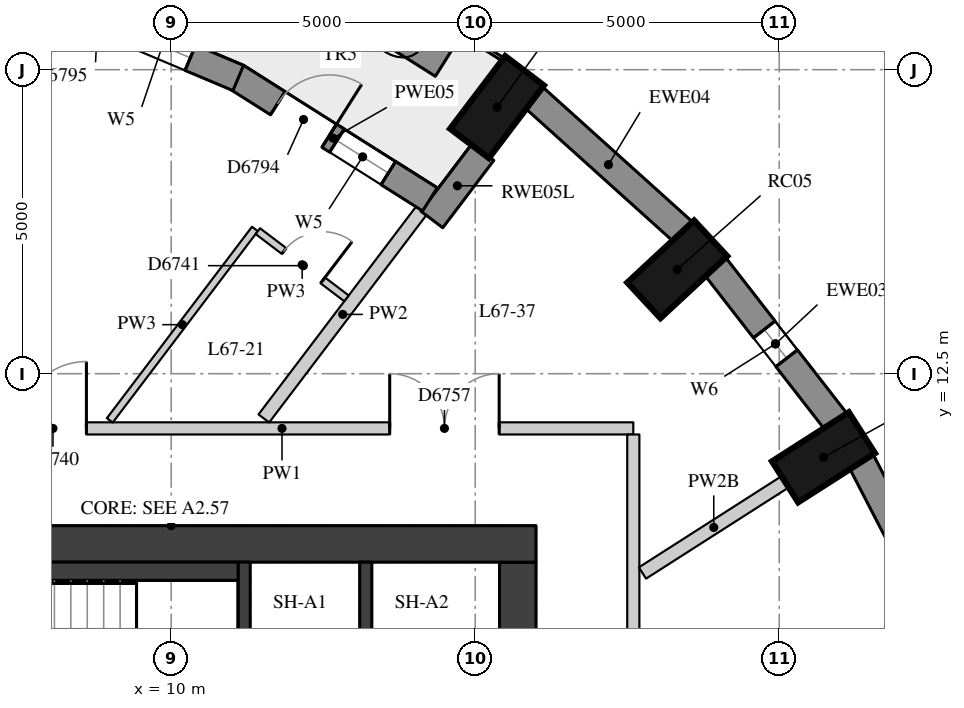
"""IFC4 building model, lengths in metres.
Left out: names, types, materials, properties, quantities, classifications, styles, units other than length and angle.
Written with IfcOpenShell. Run it as: python <this file> out.ifc"""

import sys

from ifc_helpers import new_model, si_unit, direction, frame, frame_2d, origin, origin_2d, place, context, subcontext, project, spatial, rectangle, extrude, element, fill, save


model = new_model("IFC4")
c1 = context("Model", 3, precision=1e-05, world=origin(), true_north=direction((0.0, 1.0)))
c2 = subcontext(c1, "Body", "Model", "MODEL_VIEW")
j1 = project(units=[si_unit("LENGTHUNIT", "METRE"), si_unit("PLANEANGLEUNIT", "RADIAN")], contexts=[c1])
p1 = place(None, origin())
s1 = spatial("IfcSite", under=j1, at=p1, CompositionType="ELEMENT")
p2 = place(p1, origin())
s2 = spatial("IfcBuilding", under=s1, at=p2, CompositionType="ELEMENT")
p3 = place(p2, frame((0.0, 0.0, 236.6)))
s3 = spatial("IfcBuildingStorey", under=s2, at=p3, CompositionType="ELEMENT", Elevation=236.6)
for number, where, z_axis, x_axis in (
    (1, (22.5, 7.705, 0.0), (0.0, 0.0, 1.0), (0.928, 0.374, 0.0)),
    (2, (20.728, 11.125, 0.0), (0.0, 0.0, 1.0), (0.843, 0.539, 0.0)),
    (3, (18.323, 14.216, 0.0), (0.0, 0.0, 1.0), (0.733, 0.681, 0.0)),
    (4, (15.359, 16.885, 0.0), (0.0, 0.0, 1.0), (0.604, 0.797, 0.0)),
):
    element("IfcColumn", number, at=place(p3, frame(where, z_axis=z_axis, x_axis=x_axis)), inside=s3, PredefinedType="COLUMN", context=c2, shape_type="SweptSolid", body=[
        extrude(rectangle(XDim=1.5, YDim=0.8, at=origin_2d()), origin(), (0.0, 0.0, 1.0), 3.3),
    ])
p4 = place(p3, frame((22.81, 8.24, 0.0), z_axis=(0.0, 0.0, 1.0), x_axis=(-0.459889857669, 0.887975967475, 0.0)))
e5 = element("IfcWall", 5, at=p4, inside=s3, PredefinedType="SOLIDWALL", context=c2, shape_type="SweptSolid", body=[
    extrude(rectangle(XDim=3.186, YDim=0.45, at=frame_2d((1.593, 0.0))), origin(), (0.0, 0.0, 1.0), 3.02),
])
p5 = place(p3, frame((20.935, 11.708, 0.0), z_axis=(0.0, 0.0, 1.0), x_axis=(-0.613862536705, 0.789412937587, 0.0)))
e6 = element("IfcWall", 6, at=p5, inside=s3, PredefinedType="SOLIDWALL", context=c2, shape_type="SweptSolid", body=[
    extrude(rectangle(XDim=3.247, YDim=0.45, at=frame_2d((1.624, 0.0))), origin(), (0.0, 0.0, 1.0), 3.02),
])
p6 = place(p5, frame((1.324, 0.0, 0.4)))
e7 = element("IfcOpeningElement", 7, at=p6, cuts=e6, PredefinedType="OPENING", context=c2, shape_type="SweptSolid", body=[
    extrude(rectangle(XDim=0.6, YDim=1.75, at=frame_2d((0.3, 0.875))), frame((0.0, 0.235, 0.0), z_axis=(0.0, -1.0, 0.0), x_axis=(1.0, 0.0, 0.0)), (0.0, 0.0, 1.0), 0.47),
])
p7 = place(p3, frame((18.424, 14.828, 0.0), z_axis=(0.0, 0.0, 1.0), x_axis=(-0.743166014219, 0.669107073128, 0.0)))
e8 = element("IfcWall", 8, at=p7, inside=s3, PredefinedType="SOLIDWALL", context=c2, shape_type="SweptSolid", body=[
    extrude(rectangle(XDim=3.316, YDim=0.45, at=frame_2d((1.658, 0.0))), origin(), (0.0, 0.0, 1.0), 3.02),
])
p8 = place(p3, frame((15.127, 16.145, 0.0), z_axis=(0.0, 0.0, 1.0), x_axis=(-0.603952302908, -0.797020461351, 0.0)))
e9 = element("IfcWall", 9, at=p8, inside=s3, PredefinedType="SOLIDWALL", context=c2, shape_type="SweptSolid", body=[
    extrude(rectangle(XDim=1.391, YDim=0.45, at=frame_2d((0.695, 0.0))), origin(), (0.0, 0.0, 1.0), 3.02),
])
p9 = place(p3, frame((14.255, 15.367, 0.0), z_axis=(0.0, 0.0, 1.0), x_axis=(-0.845183955488, 0.534475519912, 0.0)))
e10 = element("IfcWall", 10, at=p9, inside=s3, PredefinedType="SOLIDWALL", context=c2, shape_type="SweptSolid", body=[
    extrude(rectangle(XDim=3.769, YDim=0.45, at=frame_2d((1.884, 0.0))), origin(), (0.0, 0.0, 1.0), 3.02),
])
p10 = place(p9, frame((0.809, 0.0, 0.4)))
e11 = element("IfcOpeningElement", 11, at=p10, cuts=e10, PredefinedType="OPENING", context=c2, shape_type="SweptSolid", body=[
    extrude(rectangle(XDim=1.0, YDim=1.75, at=frame_2d((0.5, 0.875))), frame((0.0, 0.235, 0.0), z_axis=(0.0, -1.0, 0.0), x_axis=(1.0, 0.0, 0.0)), (0.0, 0.0, 1.0), 0.47),
])
p11 = place(p9, frame((1.959, 0.0, 0.0)))
e12 = element("IfcOpeningElement", 12, at=p11, cuts=e10, PredefinedType="OPENING", context=c2, shape_type="SweptSolid", body=[
    extrude(rectangle(XDim=1.0, YDim=2.15, at=frame_2d((0.5, 1.075))), frame((0.0, 0.235, 0.0), z_axis=(0.0, -1.0, 0.0), x_axis=(1.0, 0.0, 0.0)), (0.0, 0.0, 1.0), 0.47),
])
p12 = place(p3, frame((11.103, 17.364, 0.0), z_axis=(0.0, 0.0, 1.0), x_axis=(-0.921612755574, 0.388110717145, 0.0)))
e13 = element("IfcWall", 13, at=p12, inside=s3, PredefinedType="SOLIDWALL", context=c2, shape_type="SweptSolid", body=[
    extrude(rectangle(XDim=3.86, YDim=0.45, at=frame_2d((1.93, 0.0))), origin(), (0.0, 0.0, 1.0), 3.02),
])
p13 = place(p12, frame((0.855, 0.0, 0.4)))
e14 = element("IfcOpeningElement", 14, at=p13, cuts=e13, PredefinedType="OPENING", context=c2, shape_type="SweptSolid", body=[
    extrude(rectangle(XDim=1.0, YDim=1.75, at=frame_2d((0.5, 0.875))), frame((0.0, 0.235, 0.0), z_axis=(0.0, -1.0, 0.0), x_axis=(1.0, 0.0, 0.0)), (0.0, 0.0, 1.0), 0.47),
])
p14 = place(p12, frame((2.005, 0.0, 0.0)))
e15 = element("IfcOpeningElement", 15, at=p14, cuts=e13, PredefinedType="OPENING", context=c2, shape_type="SweptSolid", body=[
    extrude(rectangle(XDim=1.0, YDim=2.15, at=frame_2d((0.5, 1.075))), frame((0.0, 0.235, 0.0), z_axis=(0.0, -1.0, 0.0), x_axis=(1.0, 0.0, 0.0)), (0.0, 0.0, 1.0), 0.47),
])
p15 = place(p3, frame((14.531, 17.687, 0.0), z_axis=(0.0, 0.0, 1.0), x_axis=(-0.845888351787, 0.533360006291, 0.0)))
e16 = element("IfcWall", 16, at=p15, inside=s3, PredefinedType="USERDEFINED", context=c2, shape_type="SweptSolid", body=[
    extrude(rectangle(XDim=1.8, YDim=0.7, at=frame_2d((0.9, 0.0))), origin(), (0.0, 0.0, 1.0), 0.75),
])
p16 = place(p3, frame((15.7, -9.4, 0.0), z_axis=(0.0, 0.0, 1.0), x_axis=(0.0, 1.0, 0.0)))
e17 = element("IfcWall", 17, at=p16, inside=s3, PredefinedType="SHEAR", context=c2, shape_type="SweptSolid", body=[
    extrude(rectangle(XDim=18.8, YDim=0.6, at=frame_2d((9.4, 0.0))), origin(), (0.0, 0.0, 1.0), 3.02),
])
p17 = place(p16, frame((13.4, 0.0, 0.0)))
e18 = element("IfcOpeningElement", 18, at=p17, cuts=e17, PredefinedType="OPENING", context=c2, shape_type="SweptSolid", body=[
    extrude(rectangle(XDim=1.5, YDim=2.1, at=frame_2d((0.75, 1.05))), frame((0.0, 0.31, 0.0), z_axis=(0.0, -1.0, 0.0), x_axis=(1.0, 0.0, 0.0)), (0.0, 0.0, 1.0), 0.62),
])
p18 = place(p16, frame((3.9, 0.0, 0.0)))
e19 = element("IfcOpeningElement", 19, at=p18, cuts=e17, PredefinedType="OPENING", context=c2, shape_type="SweptSolid", body=[
    extrude(rectangle(XDim=1.5, YDim=2.1, at=frame_2d((0.75, 1.05))), frame((0.0, 0.31, 0.0), z_axis=(0.0, -1.0, 0.0), x_axis=(1.0, 0.0, 0.0)), (0.0, 0.0, 1.0), 0.62),
])
p19 = place(p3, frame((4.0, 9.7, 0.0), z_axis=(0.0, 0.0, 1.0), x_axis=(1.0, 0.0, 0.0)))
e20 = element("IfcWall", 20, at=p19, inside=s3, PredefinedType="SHEAR", context=c2, shape_type="SweptSolid", body=[
    extrude(rectangle(XDim=12.0, YDim=0.6, at=frame_2d((6.0, 0.0))), origin(), (0.0, 0.0, 1.0), 3.02),
])
for number, where, z_axis, x_axis in (
    (21, (11.2, 5.9, 0.0), (0.0, 0.0, 1.0), (0.0, 1.0, 0.0)),
    (22, (13.2, 5.9, 0.0), (0.0, 0.0, 1.0), (0.0, 1.0, 0.0)),
):
    element("IfcWall", number, at=place(p3, frame(where, z_axis=z_axis, x_axis=x_axis)), inside=s3, PredefinedType="SHEAR", context=c2, shape_type="SweptSolid", body=[
        extrude(rectangle(XDim=3.5, YDim=0.2, at=frame_2d((1.75, 0.0))), origin(), (0.0, 0.0, 1.0), 3.02),
    ])
p20 = place(p3, frame((6.22, 9.25, 0.0), z_axis=(0.0, 0.0, 1.0), x_axis=(1.0, 0.0, 0.0)))
e23 = element("IfcWall", 23, at=p20, inside=s3, PredefinedType="PARTITIONING", context=c2, shape_type="SweptSolid", body=[
    extrude(rectangle(XDim=4.88, YDim=0.3, at=frame_2d((2.44, 0.0))), origin(), (0.0, 0.0, 1.0), 3.02),
])
p21 = place(p3, frame((6.045, 11.6, 0.0), z_axis=(0.0, 0.0, 1.0), x_axis=(1.0, 0.0, 0.0)))
e24 = element("IfcWall", 24, at=p21, inside=s3, PredefinedType="PARTITIONING", context=c2, shape_type="SweptSolid", body=[
    extrude(rectangle(XDim=11.555, YDim=0.2, at=frame_2d((5.777, 0.0))), origin(), (0.0, 0.0, 1.0), 3.02),
])
p22 = place(p21, frame((1.461, 0.0, 0.0)))
e25 = element("IfcOpeningElement", 25, at=p22, cuts=e24, PredefinedType="OPENING", context=c2, shape_type="SweptSolid", body=[
    extrude(rectangle(XDim=1.1, YDim=2.1, at=frame_2d((0.55, 1.05))), frame((0.0, 0.11, 0.0), z_axis=(0.0, -1.0, 0.0), x_axis=(1.0, 0.0, 0.0)), (0.0, 0.0, 1.0), 0.22),
])
p23 = place(p21, frame((7.549, 0.0, 0.0)))
e26 = element("IfcOpeningElement", 26, at=p23, cuts=e24, PredefinedType="OPENING", context=c2, shape_type="SweptSolid", body=[
    extrude(rectangle(XDim=1.8, YDim=2.1, at=frame_2d((0.9, 1.05))), frame((0.0, 0.11, 0.0), z_axis=(0.0, -1.0, 0.0), x_axis=(1.0, 0.0, 0.0)), (0.0, 0.0, 1.0), 0.22),
])
p24 = place(p3, frame((17.6, 11.5, 0.0), z_axis=(0.0, 0.0, 1.0), x_axis=(0.0, -1.0, 0.0)))
e27 = element("IfcWall", 27, at=p24, inside=s3, PredefinedType="PARTITIONING", context=c2, shape_type="SweptSolid", body=[
    extrude(rectangle(XDim=23.1, YDim=0.2, at=frame_2d((11.55, 0.0))), origin(), (0.0, 0.0, 1.0), 3.02),
])
p25 = place(p24, frame((18.96, 0.0, 0.0)))
e28 = element("IfcOpeningElement", 28, at=p25, cuts=e27, PredefinedType="OPENING", context=c2, shape_type="SweptSolid", body=[
    extrude(rectangle(XDim=1.8, YDim=2.1, at=frame_2d((0.9, 1.05))), frame((0.0, 0.11, 0.0), z_axis=(0.0, -1.0, 0.0), x_axis=(1.0, 0.0, 0.0)), (0.0, 0.0, 1.0), 0.22),
])
p26 = place(p24, frame((11.617, 0.0, 0.0)))
e29 = element("IfcOpeningElement", 29, at=p26, cuts=e27, PredefinedType="OPENING", context=c2, shape_type="SweptSolid", body=[
    extrude(rectangle(XDim=1.8, YDim=2.1, at=frame_2d((0.9, 1.05))), frame((0.0, 0.11, 0.0), z_axis=(0.0, -1.0, 0.0), x_axis=(1.0, 0.0, 0.0)), (0.0, 0.0, 1.0), 0.22),
])
p27 = place(p24, frame((4.591, 0.0, 0.0)))
e30 = element("IfcOpeningElement", 30, at=p27, cuts=e27, PredefinedType="OPENING", context=c2, shape_type="SweptSolid", body=[
    extrude(rectangle(XDim=1.8, YDim=2.1, at=frame_2d((0.9, 1.05))), frame((0.0, 0.11, 0.0), z_axis=(0.0, -1.0, 0.0), x_axis=(1.0, 0.0, 0.0)), (0.0, 0.0, 1.0), 0.22),
])
p28 = place(p3, frame((20.096, 10.721, 0.0), z_axis=(0.0, 0.0, 1.0), x_axis=(-0.842583486412, -0.538565751256, 0.0)))
e31 = element("IfcWall", 31, at=p28, inside=s3, PredefinedType="PARTITIONING", context=c2, shape_type="SweptSolid", body=[
    extrude(rectangle(XDim=2.783, YDim=0.22, at=frame_2d((1.392, 0.0))), origin(), (0.0, 0.0, 1.0), 2.57),
])
p29 = place(p3, frame((14.119, 15.187, 0.0), z_axis=(0.0, 0.0, 1.0), x_axis=(-0.604075434344, -0.796927141978, 0.0)))
e32 = element("IfcWall", 32, at=p29, inside=s3, PredefinedType="PARTITIONING", context=c2, shape_type="SweptSolid", body=[
    extrude(rectangle(XDim=4.295, YDim=0.22, at=frame_2d((2.148, 0.0))), origin(), (0.0, 0.0, 1.0), 3.02),
])
p30 = place(p3, frame((8.99, 11.732, 0.0), z_axis=(0.0, 0.0, 1.0), x_axis=(0.604075378366, 0.79692718441, 0.0)))
e33 = element("IfcWall", 33, at=p30, inside=s3, PredefinedType="PARTITIONING", context=c2, shape_type="SweptSolid", body=[
    extrude(rectangle(XDim=3.951, YDim=0.12, at=frame_2d((1.976, 0.0))), origin(), (0.0, 0.0, 1.0), 3.02),
])
p31 = place(p3, frame((11.425, 14.844, 0.0), z_axis=(0.0, 0.0, 1.0), x_axis=(0.796899454755, -0.604111959004, 0.0)))
e34 = element("IfcWall", 34, at=p31, inside=s3, PredefinedType="PARTITIONING", context=c2, shape_type="SweptSolid", body=[
    extrude(rectangle(XDim=1.83, YDim=0.12, at=frame_2d((0.915, 0.0))), origin(), (0.0, 0.0, 1.0), 3.02),
])
p32 = place(p31, frame((0.54, 0.0, 0.0)))
e35 = element("IfcOpeningElement", 35, at=p32, cuts=e34, PredefinedType="OPENING", context=c2, shape_type="SweptSolid", body=[
    extrude(rectangle(XDim=0.8, YDim=2.1, at=frame_2d((0.4, 1.05))), frame((0.0, 0.07, 0.0), z_axis=(0.0, -1.0, 0.0), x_axis=(1.0, 0.0, 0.0)), (0.0, 0.0, 1.0), 0.14),
])
p33 = place(p6, origin())
e36 = element("IfcWindow", 36, at=p33, inside=s3, PartitioningType="SINGLE_PANEL", PredefinedType="WINDOW", context=c2, shape_type="SweptSolid", body=[
    extrude(rectangle(XDim=0.6, YDim=1.75, at=frame_2d((0.3, 0.875))), frame((0.0, 0.035, 0.0), z_axis=(0.0, -1.0, 0.0), x_axis=(1.0, 0.0, 0.0)), (0.0, 0.0, 1.0), 0.06),
])
fill(e7, e36)
p34 = place(p10, origin())
e37 = element("IfcWindow", 37, at=p34, inside=s3, PartitioningType="SINGLE_PANEL", PredefinedType="WINDOW", context=c2, shape_type="SweptSolid", body=[
    extrude(rectangle(XDim=1.0, YDim=1.75, at=frame_2d((0.5, 0.875))), frame((0.0, 0.035, 0.0), z_axis=(0.0, -1.0, 0.0), x_axis=(1.0, 0.0, 0.0)), (0.0, 0.0, 1.0), 0.06),
])
fill(e11, e37)
p35 = place(p11, frame((1.0, 0.0, 0.0), z_axis=(0.0, 0.0, 1.0), x_axis=(-1.0, 0.0, 0.0)))
e38 = element("IfcDoor", 38, at=p35, inside=s3, OperationType="SINGLE_SWING_RIGHT", PredefinedType="DOOR", context=c2, shape_type="SweptSolid", body=[
    extrude(rectangle(XDim=1.0, YDim=2.15, at=frame_2d((0.5, 1.075))), frame((0.0, 0.075, 0.0), z_axis=(0.0, -1.0, 0.0), x_axis=(1.0, 0.0, 0.0)), (0.0, 0.0, 1.0), 0.05),
])
fill(e12, e38)
p36 = place(p13, origin())
e39 = element("IfcWindow", 39, at=p36, inside=s3, PartitioningType="SINGLE_PANEL", PredefinedType="WINDOW", context=c2, shape_type="SweptSolid", body=[
    extrude(rectangle(XDim=1.0, YDim=1.75, at=frame_2d((0.5, 0.875))), frame((0.0, 0.035, 0.0), z_axis=(0.0, -1.0, 0.0), x_axis=(1.0, 0.0, 0.0)), (0.0, 0.0, 1.0), 0.06),
])
fill(e14, e39)
p37 = place(p22, origin())
e40 = element("IfcDoor", 40, at=p37, inside=s3, OperationType="SINGLE_SWING_RIGHT", PredefinedType="DOOR", context=c2, shape_type="SweptSolid", body=[
    extrude(rectangle(XDim=1.1, YDim=2.1, at=frame_2d((0.55, 1.05))), frame((0.0, 0.025, 0.0), z_axis=(0.0, -1.0, 0.0), x_axis=(1.0, 0.0, 0.0)), (0.0, 0.0, 1.0), 0.05),
])
fill(e25, e40)
p38 = place(p32, origin())
e41 = element("IfcDoor", 41, at=p38, inside=s3, OperationType="SINGLE_SWING_RIGHT", PredefinedType="DOOR", context=c2, shape_type="SweptSolid", body=[
    extrude(rectangle(XDim=0.8, YDim=2.1, at=frame_2d((0.4, 1.05))), frame((0.0, 0.025, 0.0), z_axis=(0.0, -1.0, 0.0), x_axis=(1.0, 0.0, 0.0)), (0.0, 0.0, 1.0), 0.05),
])
fill(e35, e41)
p39 = place(p23, origin())
e42 = element("IfcDoor", 42, at=p39, inside=s3, OperationType="DOUBLE_DOOR_SINGLE_SWING", PredefinedType="DOOR", context=c2, shape_type="SweptSolid", body=[
    extrude(rectangle(XDim=1.8, YDim=2.1, at=frame_2d((0.9, 1.05))), frame((0.0, 0.025, 0.0), z_axis=(0.0, -1.0, 0.0), x_axis=(1.0, 0.0, 0.0)), (0.0, 0.0, 1.0), 0.05),
])
fill(e26, e42)
save(model, sys.argv[1])
